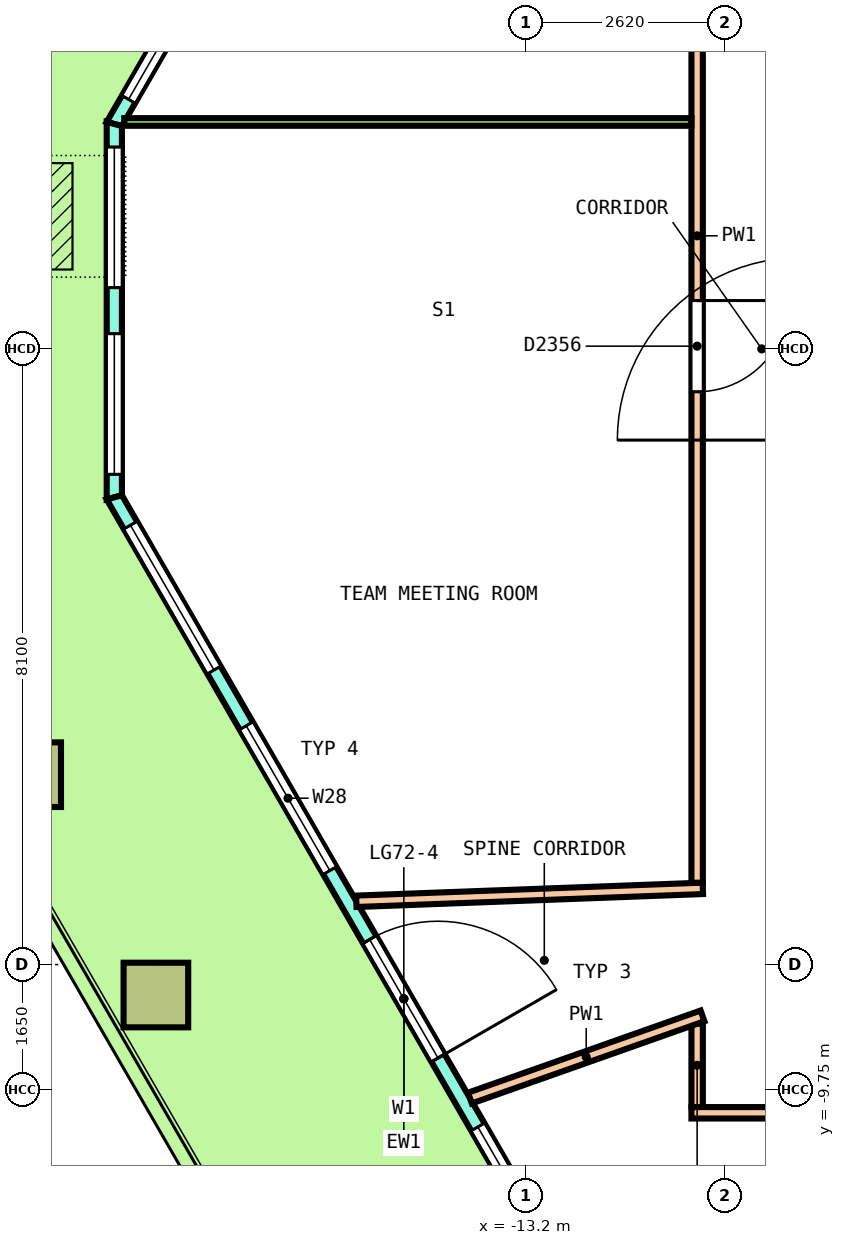
"""IFC4 building model, lengths in metres.
Left out: names, types, materials, properties, quantities, classifications, styles, units other than length and angle.
Written with IfcOpenShell. Run it as: python <this file> out.ifc"""

import sys

from ifc_helpers import new_model, si_unit, direction, frame, frame_2d, origin, origin_2d, place, context, subcontext, project, spatial, polyline, rectangle, outline, extrude, element, fill, save


model = new_model("IFC4")
c1 = context("Model", 3, precision=1e-05, world=origin(), true_north=direction((0.0, 1.0)))
c2 = subcontext(c1, "Body", "Model", "MODEL_VIEW")
j1 = project(units=[si_unit("LENGTHUNIT", "METRE"), si_unit("PLANEANGLEUNIT", "RADIAN")], contexts=[c1])
p1 = place(None, origin())
s1 = spatial("IfcSite", under=j1, at=p1, CompositionType="ELEMENT")
p2 = place(p1, origin())
s2 = spatial("IfcBuilding", under=s1, at=p2, CompositionType="ELEMENT")
p3 = place(p2, frame((0.0, 0.0, 324.6)))
s3 = spatial("IfcBuildingStorey", under=s2, at=p3, CompositionType="ELEMENT", Elevation=324.6)
p4 = place(p3, frame((-19.744, -5.602, 0.0), z_axis=(-0.010833570963, 0.018791564448, 0.999764727746), x_axis=(0.499616210892, -0.865975261025, 0.021690760837)))
e1 = element("IfcColumn", 1, at=p4, inside=s3, PredefinedType="COLUMN", context=c2, shape_type="SweptSolid", body=[
    extrude(rectangle(XDim=0.85, YDim=0.85, at=origin_2d()), origin(), (0.0, 0.0, 1.0), 3.651),
])
p5 = place(p3, frame((-18.071, -8.5, 0.0), z_axis=(-0.003611946686, 0.006220574848, 0.99997412881), x_axis=(0.501902146393, -0.864894498618, 0.007193170855)))
e2 = element("IfcColumn", 2, at=p5, inside=s3, PredefinedType="COLUMN", context=c2, shape_type="SweptSolid", body=[
    extrude(rectangle(XDim=0.85, YDim=0.85, at=origin_2d()), origin(), (0.0, 0.0, 1.0), 3.65),
])
p6 = place(p3, frame((-11.871, 14.644, 0.0), z_axis=(0.0, 0.0, 1.0), x_axis=(-0.500001755459, -0.866024390267, 0.0)))
e3 = element("IfcWall", 3, at=p6, inside=s3, PredefinedType="SOLIDWALL", context=c2, shape_type="SweptSolid", body=[
    extrude(outline(polyline([(-0.027, -0.1), (1.015, -0.1), (2.057, -0.1), (3.099, -0.1), (4.142, -0.1), (5.184, -0.1), (6.226, -0.1), (7.268, -0.1), (8.31, -0.1), (9.352, -0.1), (10.394, -0.1), (11.436, -0.1), (12.479, -0.1), (13.521, -0.1), (13.467, 0.1), (12.433, 0.1), (11.399, 0.1), (10.365, 0.1), (9.332, 0.1), (8.298, 0.1), (7.264, 0.1), (6.23, 0.1), (5.196, 0.1), (4.162, 0.1), (3.128, 0.1), (2.094, 0.1), (1.061, 0.1), (0.027, 0.1), (-0.027, -0.1)])), origin(), (0.0, 0.0, 1.0), 3.7),
])
p7 = place(p6, frame((0.374, 0.0, 0.1)))
e4 = element("IfcOpeningElement", 4, at=p7, cuts=e3, PredefinedType="OPENING", context=c2, shape_type="SweptSolid", body=[
    extrude(rectangle(XDim=1.95, YDim=2.9, at=frame_2d((0.975, 1.45))), frame((0.0, 0.11, 0.0), z_axis=(0.0, -1.0, 0.0), x_axis=(1.0, 0.0, 0.0)), (0.0, 0.0, 1.0), 0.22),
])
p8 = place(p6, frame((3.073, 0.0, 0.1)))
e5 = element("IfcOpeningElement", 5, at=p8, cuts=e3, PredefinedType="OPENING", context=c2, shape_type="SweptSolid", body=[
    extrude(rectangle(XDim=1.95, YDim=2.9, at=frame_2d((0.975, 1.45))), frame((0.0, 0.11, 0.0), z_axis=(0.0, -1.0, 0.0), x_axis=(1.0, 0.0, 0.0)), (0.0, 0.0, 1.0), 0.22),
])
p9 = place(p6, frame((5.847, 0.0, 0.0)))
e6 = element("IfcOpeningElement", 6, at=p9, cuts=e3, PredefinedType="OPENING", context=c2, shape_type="SweptSolid", body=[
    extrude(rectangle(XDim=1.8, YDim=2.4, at=frame_2d((0.9, 1.2))), frame((0.0, 0.11, 0.0), z_axis=(0.0, -1.0, 0.0), x_axis=(1.0, 0.0, 0.0)), (0.0, 0.0, 1.0), 0.22),
])
p10 = place(p6, frame((5.847, 0.0, 2.55)))
e7 = element("IfcOpeningElement", 7, at=p10, cuts=e3, PredefinedType="OPENING", context=c2, shape_type="SweptSolid", body=[
    extrude(rectangle(XDim=1.8, YDim=0.45, at=frame_2d((0.9, 0.225))), frame((0.0, 0.11, 0.0), z_axis=(0.0, -1.0, 0.0), x_axis=(1.0, 0.0, 0.0)), (0.0, 0.0, 1.0), 0.22),
])
p11 = place(p6, frame((8.47, 0.0, 0.1)))
e8 = element("IfcOpeningElement", 8, at=p11, cuts=e3, PredefinedType="OPENING", context=c2, shape_type="SweptSolid", body=[
    extrude(rectangle(XDim=1.95, YDim=2.9, at=frame_2d((0.975, 1.45))), frame((0.0, 0.11, 0.0), z_axis=(0.0, -1.0, 0.0), x_axis=(1.0, 0.0, 0.0)), (0.0, 0.0, 1.0), 0.22),
])
p12 = place(p6, frame((11.169, 0.0, 0.1)))
e9 = element("IfcOpeningElement", 9, at=p12, cuts=e3, PredefinedType="OPENING", context=c2, shape_type="SweptSolid", body=[
    extrude(rectangle(XDim=1.95, YDim=2.9, at=frame_2d((0.975, 1.45))), frame((0.0, 0.11, 0.0), z_axis=(0.0, -1.0, 0.0), x_axis=(1.0, 0.0, 0.0)), (0.0, 0.0, 1.0), 0.22),
])
p13 = place(p3, frame((-18.618, 2.958, 0.0), z_axis=(0.0, 0.0, 1.0), x_axis=(0.0, -1.0, 0.0)))
e10 = element("IfcWall", 10, at=p13, inside=s3, PredefinedType="SOLIDWALL", context=c2, shape_type="SweptSolid", body=[
    extrude(outline(polyline([(-0.027, -0.1), (1.214, -0.1), (2.456, -0.1), (3.697, -0.1), (4.938, -0.1), (4.885, 0.1), (3.67, 0.1), (2.456, 0.1), (1.241, 0.1), (0.027, 0.1), (-0.027, -0.1)])), origin(), (0.0, 0.0, 1.0), 3.7),
])
p14 = place(p13, frame((0.303, 0.0, 0.1)))
e11 = element("IfcOpeningElement", 11, at=p14, cuts=e10, PredefinedType="OPENING", context=c2, shape_type="SweptSolid", body=[
    extrude(rectangle(XDim=1.85, YDim=2.9, at=frame_2d((0.925, 1.45))), frame((0.0, 0.11, 0.0), z_axis=(0.0, -1.0, 0.0), x_axis=(1.0, 0.0, 0.0)), (0.0, 0.0, 1.0), 0.22),
])
p15 = place(p13, frame((2.759, 0.0, 0.1)))
e12 = element("IfcOpeningElement", 12, at=p15, cuts=e10, PredefinedType="OPENING", context=c2, shape_type="SweptSolid", body=[
    extrude(rectangle(XDim=1.85, YDim=2.9, at=frame_2d((0.925, 1.45))), frame((0.0, 0.11, 0.0), z_axis=(0.0, -1.0, 0.0), x_axis=(1.0, 0.0, 0.0)), (0.0, 0.0, 1.0), 0.22),
])
p16 = place(p3, frame((-18.618, -1.953, 0.0), z_axis=(0.0, 0.0, 1.0), x_axis=(0.500003117631, -0.866023603812, 0.0)))
e13 = element("IfcWall", 13, at=p16, inside=s3, PredefinedType="SOLIDWALL", context=c2, shape_type="SweptSolid", body=[
    extrude(outline(polyline([(-0.027, -0.1), (0.992, -0.1), (2.012, -0.1), (3.031, -0.1), (4.05, -0.1), (5.07, -0.1), (6.089, -0.1), (7.108, -0.1), (8.127, -0.1), (9.146, -0.1), (10.166, -0.1), (11.185, -0.1), (12.204, -0.1), (13.224, -0.1), (14.243, -0.1), (15.262, -0.1), (15.208, 0.1), (14.196, 0.1), (13.184, 0.1), (12.172, 0.1), (11.16, 0.1), (10.148, 0.1), (9.136, 0.1), (8.124, 0.1), (7.112, 0.1), (6.1, 0.1), (5.087, 0.1), (4.075, 0.1), (3.063, 0.1), (2.051, 0.1), (1.039, 0.1), (0.027, 0.1), (-0.027, -0.1)])), origin(), (0.0, 0.0, 1.0), 3.7),
])
p17 = place(p16, frame((0.424, 0.0, 0.1)))
e14 = element("IfcOpeningElement", 14, at=p17, cuts=e13, PredefinedType="OPENING", context=c2, shape_type="SweptSolid", body=[
    extrude(rectangle(XDim=2.2, YDim=2.9, at=frame_2d((1.1, 1.45))), frame((0.0, 0.11, 0.0), z_axis=(0.0, -1.0, 0.0), x_axis=(1.0, 0.0, 0.0)), (0.0, 0.0, 1.0), 0.22),
])
p18 = place(p16, frame((3.47, 0.0, 0.1)))
e15 = element("IfcOpeningElement", 15, at=p18, cuts=e13, PredefinedType="OPENING", context=c2, shape_type="SweptSolid", body=[
    extrude(rectangle(XDim=2.2, YDim=2.9, at=frame_2d((1.1, 1.45))), frame((0.0, 0.11, 0.0), z_axis=(0.0, -1.0, 0.0), x_axis=(1.0, 0.0, 0.0)), (0.0, 0.0, 1.0), 0.22),
])
p19 = place(p16, frame((6.718, 0.0, 0.0)))
e16 = element("IfcOpeningElement", 16, at=p19, cuts=e13, PredefinedType="OPENING", context=c2, shape_type="SweptSolid", body=[
    extrude(rectangle(XDim=1.8, YDim=2.4, at=frame_2d((0.9, 1.2))), frame((0.0, 0.11, 0.0), z_axis=(0.0, -1.0, 0.0), x_axis=(1.0, 0.0, 0.0)), (0.0, 0.0, 1.0), 0.22),
])
p20 = place(p16, frame((6.718, 0.0, 2.55)))
e17 = element("IfcOpeningElement", 17, at=p20, cuts=e13, PredefinedType="OPENING", context=c2, shape_type="SweptSolid", body=[
    extrude(rectangle(XDim=1.8, YDim=0.45, at=frame_2d((0.9, 0.225))), frame((0.0, 0.11, 0.0), z_axis=(0.0, -1.0, 0.0), x_axis=(1.0, 0.0, 0.0)), (0.0, 0.0, 1.0), 0.22),
])
p21 = place(p16, frame((9.565, 0.0, 0.1)))
e18 = element("IfcOpeningElement", 18, at=p21, cuts=e13, PredefinedType="OPENING", context=c2, shape_type="SweptSolid", body=[
    extrude(rectangle(XDim=2.2, YDim=2.9, at=frame_2d((1.1, 1.45))), frame((0.0, 0.11, 0.0), z_axis=(0.0, -1.0, 0.0), x_axis=(1.0, 0.0, 0.0)), (0.0, 0.0, 1.0), 0.22),
])
p22 = place(p16, frame((12.612, 0.0, 0.1)))
e19 = element("IfcOpeningElement", 19, at=p22, cuts=e13, PredefinedType="OPENING", context=c2, shape_type="SweptSolid", body=[
    extrude(rectangle(XDim=2.2, YDim=2.9, at=frame_2d((1.1, 1.45))), frame((0.0, 0.11, 0.0), z_axis=(0.0, -1.0, 0.0), x_axis=(1.0, 0.0, 0.0)), (0.0, 0.0, 1.0), 0.22),
])
p23 = place(p3, frame((-10.95, -9.975, 0.0), z_axis=(0.0, 0.0, 1.0), x_axis=(0.0, 1.0, 0.0)))
e20 = element("IfcWall", 20, at=p23, inside=s3, PredefinedType="PARTITIONING", context=c2, shape_type="SweptSolid", body=[
    extrude(rectangle(XDim=1.1, YDim=0.15, at=frame_2d((0.55, 0.0))), origin(), (0.0, 0.0, 1.0), 3.7),
])
p24 = place(p3, frame((-10.95, -7.025, 0.0), z_axis=(0.0, 0.0, 1.0), x_axis=(0.0, 1.0, 0.0)))
e21 = element("IfcWall", 21, at=p24, inside=s3, PredefinedType="PARTITIONING", context=c2, shape_type="SweptSolid", body=[
    extrude(rectangle(XDim=17.025, YDim=0.15, at=frame_2d((8.512, 0.0))), origin(), (0.0, 0.0, 1.0), 3.05),
])
p25 = place(p24, frame((11.857, 0.0, 0.0)))
e22 = element("IfcOpeningElement", 22, at=p25, cuts=e21, PredefinedType="OPENING", context=c2, shape_type="SweptSolid", body=[
    extrude(rectangle(XDim=1.0, YDim=2.1, at=frame_2d((0.5, 1.05))), frame((0.0, 0.085, 0.0), z_axis=(0.0, -1.0, 0.0), x_axis=(1.0, 0.0, 0.0)), (0.0, 0.0, 1.0), 0.17),
])
p26 = place(p24, frame((6.461, 0.0, 0.0)))
e23 = element("IfcOpeningElement", 23, at=p26, cuts=e21, PredefinedType="OPENING", context=c2, shape_type="SweptSolid", body=[
    extrude(rectangle(XDim=1.2, YDim=2.1, at=frame_2d((0.6, 1.05))), frame((0.0, 0.085, 0.0), z_axis=(0.0, -1.0, 0.0), x_axis=(1.0, 0.0, 0.0)), (0.0, 0.0, 1.0), 0.17),
])
p27 = place(p3, frame((-11.025, -10.05, 0.0), z_axis=(0.0, 0.0, 1.0), x_axis=(1.0, 0.0, 0.0)))
e24 = element("IfcWall", 24, at=p27, inside=s3, PredefinedType="PARTITIONING", context=c2, shape_type="SweptSolid", body=[
    extrude(rectangle(XDim=21.925, YDim=0.15, at=frame_2d((10.962, 0.0))), origin(), (0.0, 0.0, 1.0), 3.05),
])
p28 = place(p27, frame((2.035, 0.0, 0.0)))
e25 = element("IfcOpeningElement", 25, at=p28, cuts=e24, PredefinedType="OPENING", context=c2, shape_type="SweptSolid", body=[
    extrude(rectangle(XDim=1.0, YDim=2.1, at=frame_2d((0.5, 1.05))), frame((0.0, 0.085, 0.0), z_axis=(0.0, -1.0, 0.0), x_axis=(1.0, 0.0, 0.0)), (0.0, 0.0, 1.0), 0.17),
])
p29 = place(p27, frame((7.019, 0.0, 0.0)))
e26 = element("IfcOpeningElement", 26, at=p29, cuts=e24, PredefinedType="OPENING", context=c2, shape_type="SweptSolid", body=[
    extrude(rectangle(XDim=1.0, YDim=2.1, at=frame_2d((0.5, 1.05))), frame((0.0, 0.085, 0.0), z_axis=(0.0, -1.0, 0.0), x_axis=(1.0, 0.0, 0.0)), (0.0, 0.0, 1.0), 0.17),
])
p30 = place(p27, frame((12.27, 0.0, 0.0)))
e27 = element("IfcOpeningElement", 27, at=p30, cuts=e24, PredefinedType="OPENING", context=c2, shape_type="SweptSolid", body=[
    extrude(rectangle(XDim=1.0, YDim=2.1, at=frame_2d((0.5, 1.05))), frame((0.0, 0.085, 0.0), z_axis=(0.0, -1.0, 0.0), x_axis=(1.0, 0.0, 0.0)), (0.0, 0.0, 1.0), 0.17),
])
p31 = place(p27, frame((18.306, 0.0, 0.0)))
e28 = element("IfcOpeningElement", 28, at=p31, cuts=e24, PredefinedType="OPENING", context=c2, shape_type="SweptSolid", body=[
    extrude(rectangle(XDim=1.0, YDim=2.1, at=frame_2d((0.5, 1.05))), frame((0.0, 0.085, 0.0), z_axis=(0.0, -1.0, 0.0), x_axis=(1.0, 0.0, 0.0)), (0.0, 0.0, 1.0), 0.17),
])
p32 = place(p27, frame((20.543, 0.0, 0.0)))
e29 = element("IfcOpeningElement", 29, at=p32, cuts=e24, PredefinedType="OPENING", context=c2, shape_type="SweptSolid", body=[
    extrude(rectangle(XDim=1.0, YDim=2.1, at=frame_2d((0.5, 1.05))), frame((0.0, 0.085, 0.0), z_axis=(0.0, -1.0, 0.0), x_axis=(1.0, 0.0, 0.0)), (0.0, 0.0, 1.0), 0.17),
])
p33 = place(p3, frame((-15.434, -7.268, 0.0), z_axis=(0.0, 0.0, 1.0), x_axis=(0.999302167233, 0.037352089147, 0.0)))
e30 = element("IfcWall", 30, at=p33, inside=s3, PredefinedType="PARTITIONING", context=c2, shape_type="SweptSolid", body=[
    extrude(rectangle(XDim=4.562, YDim=0.15, at=frame_2d((2.281, 0.0))), origin(), (0.0, 0.0, 1.0), 3.05),
])
p34 = place(p3, frame((-13.939, -9.856, 0.0), z_axis=(0.0, 0.0, 1.0), x_axis=(0.942866668551, 0.333170294799, 0.0)))
e31 = element("IfcWall", 31, at=p34, inside=s3, PredefinedType="PARTITIONING", context=c2, shape_type="SweptSolid", body=[
    extrude(rectangle(XDim=3.246, YDim=0.15, at=frame_2d((1.623, 0.0))), origin(), (0.0, 0.0, 1.0), 3.05),
])
p35 = place(p3, frame((-18.487, 2.985, 0.0), z_axis=(0.0, 0.0, 1.0), x_axis=(1.0, 0.0, 0.0)))
e32 = element("IfcWall", 32, at=p35, inside=s3, PredefinedType="PARTITIONING", context=c2, shape_type="SweptSolid", body=[
    extrude(rectangle(XDim=7.462, YDim=0.1, at=frame_2d((3.731, 0.0))), origin(), (0.0, 0.0, 1.0), 3.05),
])
p36 = place(p12, origin())
e33 = element("IfcWindow", 33, at=p36, inside=s3, PartitioningType="SINGLE_PANEL", PredefinedType="WINDOW", context=c2, shape_type="SweptSolid", body=[
    extrude(rectangle(XDim=1.95, YDim=2.9, at=frame_2d((0.975, 1.45))), frame((0.0, 0.03, 0.0), z_axis=(0.0, -1.0, 0.0), x_axis=(1.0, 0.0, 0.0)), (0.0, 0.0, 1.0), 0.06),
])
fill(e9, e33)
p37 = place(p14, origin())
e34 = element("IfcWindow", 34, at=p37, inside=s3, PartitioningType="SINGLE_PANEL", PredefinedType="WINDOW", context=c2, shape_type="SweptSolid", body=[
    extrude(rectangle(XDim=1.85, YDim=2.9, at=frame_2d((0.925, 1.45))), frame((0.0, 0.03, 0.0), z_axis=(0.0, -1.0, 0.0), x_axis=(1.0, 0.0, 0.0)), (0.0, 0.0, 1.0), 0.06),
])
fill(e11, e34)
p38 = place(p15, origin())
e35 = element("IfcWindow", 35, at=p38, inside=s3, PartitioningType="SINGLE_PANEL", PredefinedType="WINDOW", context=c2, shape_type="SweptSolid", body=[
    extrude(rectangle(XDim=1.85, YDim=2.9, at=frame_2d((0.925, 1.45))), frame((0.0, 0.03, 0.0), z_axis=(0.0, -1.0, 0.0), x_axis=(1.0, 0.0, 0.0)), (0.0, 0.0, 1.0), 0.06),
])
fill(e12, e35)
p39 = place(p17, origin())
e36 = element("IfcWindow", 36, at=p39, inside=s3, PartitioningType="SINGLE_PANEL", PredefinedType="WINDOW", context=c2, shape_type="SweptSolid", body=[
    extrude(rectangle(XDim=2.2, YDim=2.9, at=frame_2d((1.1, 1.45))), frame((0.0, 0.03, 0.0), z_axis=(0.0, -1.0, 0.0), x_axis=(1.0, 0.0, 0.0)), (0.0, 0.0, 1.0), 0.06),
])
fill(e14, e36)
p40 = place(p18, origin())
e37 = element("IfcWindow", 37, at=p40, inside=s3, PartitioningType="SINGLE_PANEL", PredefinedType="WINDOW", context=c2, shape_type="SweptSolid", body=[
    extrude(rectangle(XDim=2.2, YDim=2.9, at=frame_2d((1.1, 1.45))), frame((0.0, 0.03, 0.0), z_axis=(0.0, -1.0, 0.0), x_axis=(1.0, 0.0, 0.0)), (0.0, 0.0, 1.0), 0.06),
])
fill(e15, e37)
p41 = place(p19, origin())
e38 = element("IfcDoor", 38, at=p41, inside=s3, OperationType="DOUBLE_DOOR_SINGLE_SWING", PredefinedType="DOOR", context=c2, shape_type="SweptSolid", body=[
    extrude(rectangle(XDim=1.8, YDim=2.4, at=frame_2d((0.9, 1.2))), frame((0.0, 0.025, 0.0), z_axis=(0.0, -1.0, 0.0), x_axis=(1.0, 0.0, 0.0)), (0.0, 0.0, 1.0), 0.05),
])
fill(e16, e38)
p42 = place(p20, origin())
e39 = element("IfcWindow", 39, at=p42, inside=s3, PartitioningType="SINGLE_PANEL", PredefinedType="WINDOW", context=c2, shape_type="SweptSolid", body=[
    extrude(rectangle(XDim=1.8, YDim=0.45, at=frame_2d((0.9, 0.225))), frame((0.0, 0.03, 0.0), z_axis=(0.0, -1.0, 0.0), x_axis=(1.0, 0.0, 0.0)), (0.0, 0.0, 1.0), 0.06),
])
fill(e17, e39)
p43 = place(p21, origin())
e40 = element("IfcWindow", 40, at=p43, inside=s3, PartitioningType="SINGLE_PANEL", PredefinedType="WINDOW", context=c2, shape_type="SweptSolid", body=[
    extrude(rectangle(XDim=2.2, YDim=2.9, at=frame_2d((1.1, 1.45))), frame((0.0, 0.03, 0.0), z_axis=(0.0, -1.0, 0.0), x_axis=(1.0, 0.0, 0.0)), (0.0, 0.0, 1.0), 0.06),
])
fill(e18, e40)
p44 = place(p26, origin())
e41 = element("IfcDoor", 41, at=p44, inside=s3, OperationType="DOUBLE_DOOR_SINGLE_SWING", PredefinedType="DOOR", context=c2, shape_type="SweptSolid", body=[
    extrude(rectangle(XDim=1.2, YDim=2.1, at=frame_2d((0.6, 1.05))), frame((0.0, 0.025, 0.0), z_axis=(0.0, -1.0, 0.0), x_axis=(1.0, 0.0, 0.0)), (0.0, 0.0, 1.0), 0.05),
])
fill(e23, e41)
save(model, sys.argv[1])
